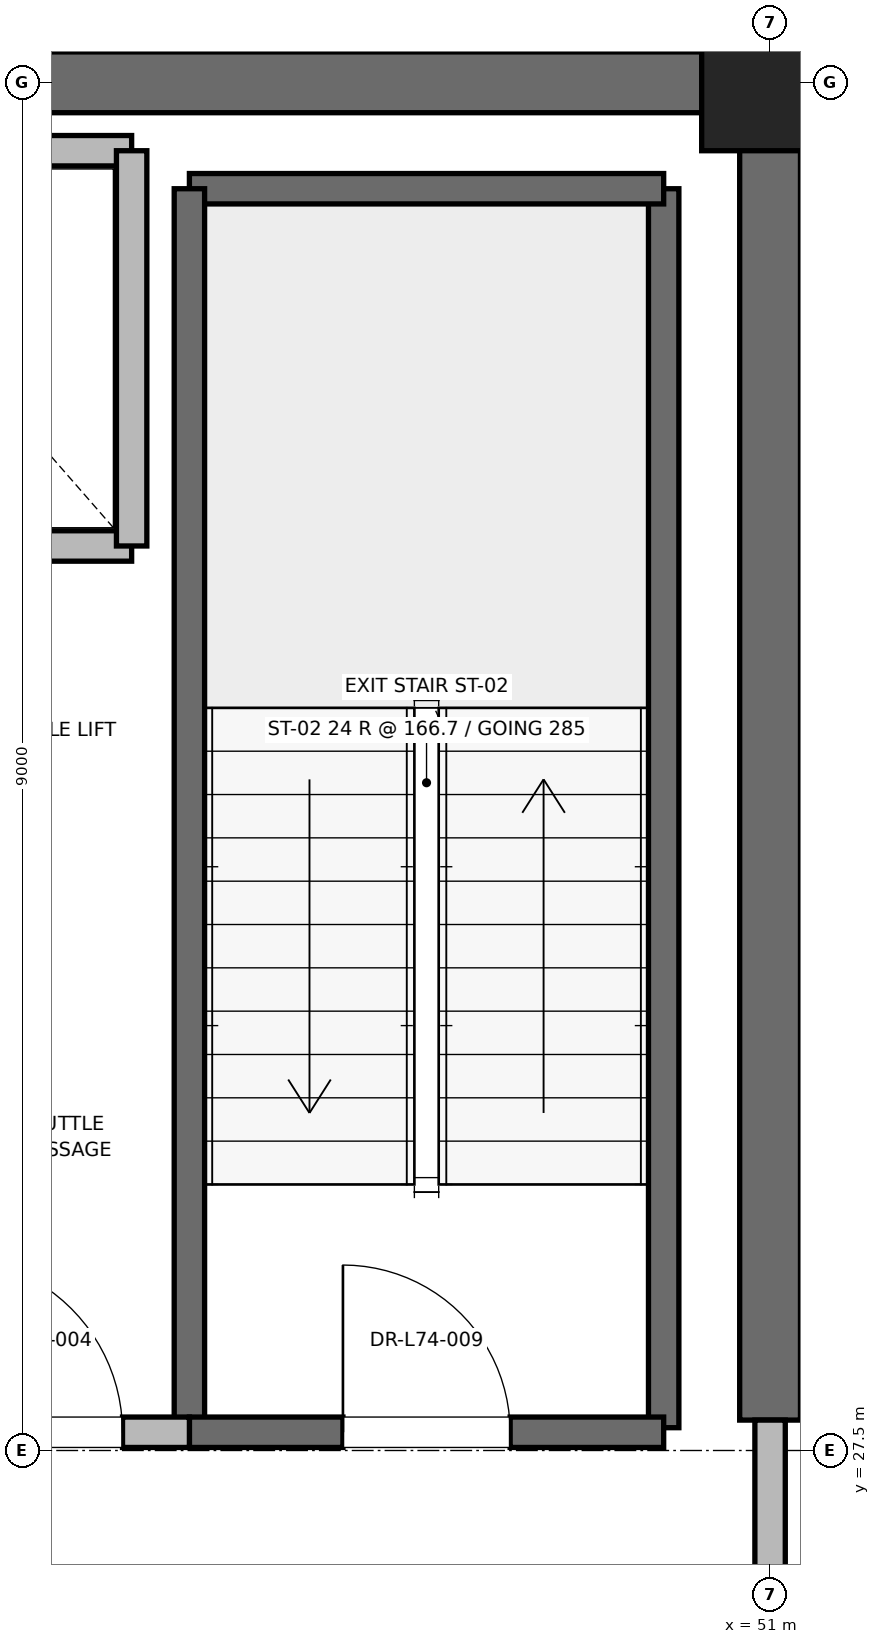
"""IFC4 building model, lengths in metres.
Left out: names, types, materials, properties, quantities, classifications, styles, units other than length and angle.
Written with IfcOpenShell. Run it as: python <this file> out.ifc"""

import sys

from ifc_helpers import new_model, si_unit, direction, frame, frame_2d, origin, origin_2d, place, context, subcontext, project, spatial, rectangle, extrude, element, fill, save


model = new_model("IFC4")
c1 = context("Model", 3, precision=1e-05, world=origin(), true_north=direction((0.0, 1.0)))
c2 = subcontext(c1, "Body", "Model", "MODEL_VIEW")
j1 = project(units=[si_unit("LENGTHUNIT", "METRE"), si_unit("PLANEANGLEUNIT", "RADIAN")], contexts=[c1])
p1 = place(None, origin())
s1 = spatial("IfcSite", under=j1, at=p1, CompositionType="ELEMENT")
p2 = place(p1, origin())
s2 = spatial("IfcBuilding", under=s1, at=p2, CompositionType="ELEMENT")
p3 = place(p2, frame((0.0, 0.0, 318.8)))
s3 = spatial("IfcBuildingStorey", under=s2, at=p3, CompositionType="ELEMENT", Elevation=318.8)
p4 = place(p3, frame((51.0, 36.5, 0.0), z_axis=(0.0, 0.0, 1.0), x_axis=(1.0, 0.0, 0.0)))
e1 = element("IfcColumn", 1, at=p4, inside=s3, PredefinedType="PILASTER", context=c2, shape_type="SweptSolid", body=[
    extrude(rectangle(XDim=0.9, YDim=0.9, at=origin_2d()), origin(), (0.0, 0.0, 1.0), 4.0),
])
p5 = place(p3, frame((45.2, 36.5, 0.0), z_axis=(0.0, 0.0, 1.0), x_axis=(1.0, 0.0, 0.0)))
e2 = element("IfcWall", 2, at=p5, inside=s3, PredefinedType="SHEAR", context=c2, shape_type="SweptSolid", body=[
    extrude(rectangle(XDim=5.8, YDim=0.4, at=frame_2d((2.9, 0.0))), origin(), (0.0, 0.0, 1.0), 3.785),
])
p6 = place(p3, frame((51.0, 27.7, 0.0), z_axis=(0.0, 0.0, 1.0), x_axis=(0.0, 1.0, 0.0)))
e3 = element("IfcWall", 3, at=p6, inside=s3, PredefinedType="SHEAR", context=c2, shape_type="SweptSolid", body=[
    extrude(rectangle(XDim=8.8, YDim=0.4, at=frame_2d((4.4, 0.0))), origin(), (0.0, 0.0, 1.0), 3.785),
])
p7 = place(p3, frame((50.3, 27.65, 0.0), z_axis=(0.0, 0.0, 1.0), x_axis=(0.0, 1.0, 0.0)))
e4 = element("IfcWall", 4, at=p7, inside=s3, PredefinedType="SOLIDWALL", context=c2, shape_type="SweptSolid", body=[
    extrude(rectangle(XDim=8.15, YDim=0.2, at=frame_2d((4.075, 0.0))), origin(), (0.0, 0.0, 1.0), 3.785),
])
p8 = place(p3, frame((47.18, 35.8, 0.0), z_axis=(0.0, 0.0, 1.0), x_axis=(1.0, 0.0, 0.0)))
e5 = element("IfcWall", 5, at=p8, inside=s3, PredefinedType="SOLIDWALL", context=c2, shape_type="SweptSolid", body=[
    extrude(rectangle(XDim=3.12, YDim=0.2, at=frame_2d((1.56, 0.0))), origin(), (0.0, 0.0, 1.0), 3.785),
])
p9 = place(p3, frame((47.18, 27.62, 0.0), z_axis=(0.0, 0.0, 1.0), x_axis=(0.0, 1.0, 0.0)))
e6 = element("IfcWall", 6, at=p9, inside=s3, PredefinedType="SOLIDWALL", context=c2, shape_type="SweptSolid", body=[
    extrude(rectangle(XDim=8.18, YDim=0.2, at=frame_2d((4.09, 0.0))), origin(), (0.0, 0.0, 1.0), 3.785),
])
p10 = place(p3, frame((47.18, 27.62, 0.0), z_axis=(0.0, 0.0, 1.0), x_axis=(1.0, 0.0, 0.0)))
e7 = element("IfcWall", 7, at=p10, inside=s3, PredefinedType="SOLIDWALL", context=c2, shape_type="SweptSolid", body=[
    extrude(rectangle(XDim=3.12, YDim=0.2, at=frame_2d((1.56, 0.0))), origin(), (0.0, 0.0, 1.0), 3.785),
])
p11 = place(p10, frame((1.01, 0.0, 0.0)))
e8 = element("IfcOpeningElement", 8, at=p11, cuts=e7, PredefinedType="OPENING", context=c2, shape_type="SweptSolid", body=[
    extrude(rectangle(XDim=1.1, YDim=2.15, at=frame_2d((0.55, 1.075))), frame((0.0, 0.1, 0.0), z_axis=(0.0, -1.0, 0.0), x_axis=(1.0, 0.0, 0.0)), (0.0, 0.0, 1.0), 0.2),
])
p12 = place(p3, frame((45.15, 27.62, 0.0), z_axis=(0.0, 0.0, 1.0), x_axis=(1.0, 0.0, 0.0)))
e9 = element("IfcWall", 9, at=p12, inside=s3, PredefinedType="PARTITIONING", context=c2, shape_type="SweptSolid", body=[
    extrude(rectangle(XDim=2.03, YDim=0.2, at=frame_2d((1.015, 0.0))), origin(), (0.0, 0.0, 1.0), 3.785),
])
p13 = place(p12, frame((0.44, 0.0, 0.0)))
e10 = element("IfcOpeningElement", 10, at=p13, cuts=e9, PredefinedType="OPENING", context=c2, shape_type="SweptSolid", body=[
    extrude(rectangle(XDim=1.15, YDim=2.2, at=frame_2d((0.575, 1.1))), frame((0.0, 0.1, 0.0), z_axis=(0.0, -1.0, 0.0), x_axis=(1.0, 0.0, 0.0)), (0.0, 0.0, 1.0), 0.2),
])
p14 = place(p3, frame((51.0, 24.3, 0.0), z_axis=(0.0, 0.0, 1.0), x_axis=(0.0, 1.0, 0.0)))
e11 = element("IfcWall", 11, at=p14, inside=s3, PredefinedType="PARTITIONING", context=c2, shape_type="SweptSolid", body=[
    extrude(rectangle(XDim=3.4, YDim=0.2, at=frame_2d((1.7, 0.0))), origin(), (0.0, 0.0, 1.0), 2.865),
])
p15 = place(p14, frame((1.125, 0.0, 0.0)))
e12 = element("IfcOpeningElement", 12, at=p15, cuts=e11, PredefinedType="OPENING", context=c2, shape_type="SweptSolid", body=[
    extrude(rectangle(XDim=1.15, YDim=2.2, at=frame_2d((0.575, 1.1))), frame((0.0, 0.1, 0.0), z_axis=(0.0, -1.0, 0.0), x_axis=(1.0, 0.0, 0.0)), (0.0, 0.0, 1.0), 0.2),
])
p16 = place(p3, frame((44.5, 33.45, 0.0), z_axis=(0.0, 0.0, 1.0), x_axis=(1.0, 0.0, 0.0)))
e13 = element("IfcWall", 13, at=p16, inside=s3, PredefinedType="SOLIDWALL", context=c2, shape_type="SweptSolid", body=[
    extrude(rectangle(XDim=2.3, YDim=0.2, at=frame_2d((1.15, 0.0))), origin(), (0.0, 0.0, 1.0), 3.785),
])
p17 = place(p3, frame((46.8, 36.05, 0.0), z_axis=(0.0, 0.0, 1.0), x_axis=(-1.0, 0.0, 0.0)))
e14 = element("IfcWall", 14, at=p17, inside=s3, PredefinedType="SOLIDWALL", context=c2, shape_type="SweptSolid", body=[
    extrude(rectangle(XDim=2.3, YDim=0.2, at=frame_2d((1.15, 0.0))), origin(), (0.0, 0.0, 1.0), 2.865),
])
p18 = place(p3, frame((46.8, 33.45, 0.0), z_axis=(0.0, 0.0, 1.0), x_axis=(0.0, 1.0, 0.0)))
e15 = element("IfcWall", 15, at=p18, inside=s3, PredefinedType="SOLIDWALL", context=c2, shape_type="SweptSolid", body=[
    extrude(rectangle(XDim=2.6, YDim=0.2, at=frame_2d((1.3, 0.0))), origin(), (0.0, 0.0, 1.0), 3.785),
])
p19 = place(p11, origin())
e16 = element("IfcDoor", 16, at=p19, inside=s3, OperationType="SINGLE_SWING_LEFT", PredefinedType="DOOR", context=c2, shape_type="SweptSolid", body=[
    extrude(rectangle(XDim=1.1, YDim=2.15, at=frame_2d((0.55, 1.075))), frame((0.0, 0.025, 0.0), z_axis=(0.0, -1.0, 0.0), x_axis=(1.0, 0.0, 0.0)), (0.0, 0.0, 1.0), 0.05),
])
fill(e8, e16)
p20 = place(p13, origin())
e17 = element("IfcDoor", 17, at=p20, inside=s3, OperationType="SINGLE_SWING_LEFT", PredefinedType="DOOR", context=c2, shape_type="SweptSolid", body=[
    extrude(rectangle(XDim=1.15, YDim=2.2, at=frame_2d((0.575, 1.1))), frame((0.0, 0.025, 0.0), z_axis=(0.0, -1.0, 0.0), x_axis=(1.0, 0.0, 0.0)), (0.0, 0.0, 1.0), 0.05),
])
fill(e10, e17)
save(model, sys.argv[1])
